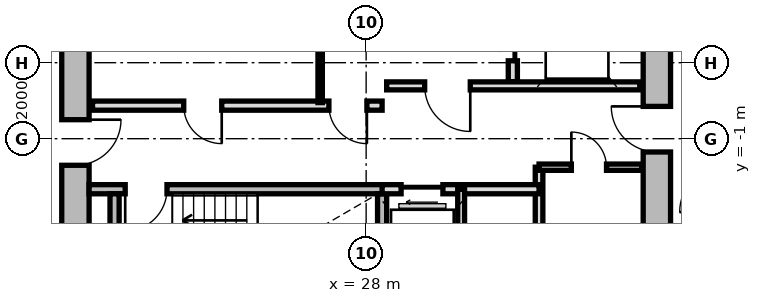
"""IFC4 building model, lengths in metres.
Left out: names, types, materials, properties, quantities, classifications, styles, units other than length and angle.
Written with IfcOpenShell. Run it as: python <this file> out.ifc"""

import sys

from ifc_helpers import new_model, si_unit, direction, frame, frame_2d, origin, place, context, subcontext, project, spatial, rectangle, extrude, source, transform, mapped, element, fill, save


model = new_model("IFC4")
c1 = context("Model", 3, precision=1e-05, world=origin(), true_north=direction((0.0, 1.0)))
c2 = subcontext(c1, "Body", "Model", "MODEL_VIEW")
j1 = project(units=[si_unit("LENGTHUNIT", "METRE"), si_unit("PLANEANGLEUNIT", "RADIAN")], contexts=[c1])
p1 = place(None, origin())
s1 = spatial("IfcSite", under=j1, at=p1, CompositionType="ELEMENT")
p2 = place(p1, origin())
s2 = spatial("IfcBuilding", under=s1, at=p2, CompositionType="ELEMENT")
p3 = place(p2, frame((0.0, 0.0, 99.3)))
s3 = spatial("IfcBuildingStorey", under=s2, at=p3, CompositionType="ELEMENT", Elevation=99.3)
m1 = source(origin(), c2, "Body", "SweptSolid", [
    extrude(rectangle(XDim=11.0, YDim=0.72, at=frame_2d((5.5, 0.0))), origin(), (0.0, 0.0, 1.0), 2.79),
])
p4 = place(p3, frame((20.35, -5.5, 0.0), z_axis=(0.0, 0.0, 1.0), x_axis=(0.0, 1.0, 0.0)))
e1 = element("IfcWall", 1, at=p4, inside=s3, PredefinedType="SHEAR", context=c2, shape_type="MappedRepresentation", body=[
    mapped(m1, transform((0.0, 0.0, 0.0), x_axis=(1.0, 0.0, 0.0), y_axis=(0.0, 1.0, 0.0), z_axis=(0.0, 0.0, 1.0), scale=1.0)),
])
p5 = place(p4, frame((3.8, 0.0, 0.0)))
e2 = element("IfcOpeningElement", 2, at=p5, cuts=e1, PredefinedType="OPENING", context=c2, shape_type="SweptSolid", body=[
    extrude(rectangle(XDim=1.2, YDim=2.15, at=frame_2d((0.6, 1.075))), frame((0.0, 0.37, 0.0), z_axis=(0.0, -1.0, 0.0), x_axis=(1.0, 0.0, 0.0)), (0.0, 0.0, 1.0), 0.74),
])
p6 = place(p3, frame((35.65, 5.5, 0.0), z_axis=(0.0, 0.0, 1.0), x_axis=(0.0, -1.0, 0.0)))
e3 = element("IfcWall", 3, at=p6, inside=s3, PredefinedType="SHEAR", context=c2, shape_type="MappedRepresentation", body=[
    mapped(m1, transform((0.0, 0.0, 0.0), x_axis=(1.0, 0.0, 0.0), y_axis=(0.0, 1.0, 0.0), z_axis=(0.0, 0.0, 1.0), scale=1.0)),
])
p7 = place(p6, frame((5.65, 0.0, 0.0)))
e4 = element("IfcOpeningElement", 4, at=p7, cuts=e3, PredefinedType="OPENING", context=c2, shape_type="SweptSolid", body=[
    extrude(rectangle(XDim=1.2, YDim=2.15, at=frame_2d((0.6, 1.075))), frame((0.0, 0.37, 0.0), z_axis=(0.0, -1.0, 0.0), x_axis=(1.0, 0.0, 0.0)), (0.0, 0.0, 1.0), 0.74),
])
m2 = source(origin(), c2, "Body", "SweptSolid", [
    extrude(rectangle(XDim=7.83, YDim=0.24, at=frame_2d((3.915, 0.0))), origin(), (0.0, 0.0, 1.0), 2.79),
])
p8 = place(p3, frame((20.71, -2.33, 0.0), z_axis=(0.0, 0.0, 1.0), x_axis=(1.0, 0.0, 0.0)))
e5 = element("IfcWall", 5, at=p8, inside=s3, PredefinedType="PARTITIONING", context=c2, shape_type="MappedRepresentation", body=[
    mapped(m2, transform((0.0, 0.0, 0.0), x_axis=(1.0, 0.0, 0.0), y_axis=(0.0, 1.0, 0.0), z_axis=(0.0, 0.0, 1.0), scale=1.0)),
])
p9 = place(p8, frame((0.95, 0.0, 0.0)))
e6 = element("IfcOpeningElement", 6, at=p9, cuts=e5, PredefinedType="OPENING", context=c2, shape_type="SweptSolid", body=[
    extrude(rectangle(XDim=1.1, YDim=2.15, at=frame_2d((0.55, 1.075))), frame((0.0, 0.13, 0.0), z_axis=(0.0, -1.0, 0.0), x_axis=(1.0, 0.0, 0.0)), (0.0, 0.0, 1.0), 0.26),
])
m3 = source(origin(), c2, "Body", "SweptSolid", [
    extrude(rectangle(XDim=3.14, YDim=0.24, at=frame_2d((1.57, 0.0))), origin(), (0.0, 0.0, 1.0), 2.79),
])
for number, where, z_axis, x_axis in (
    (7, (21.38, -5.59, 0.0), (0.0, 0.0, 1.0), (0.0, 1.0, 0.0)),
    (8, (28.42, -5.59, 0.0), (0.0, 0.0, 1.0), (0.0, 1.0, 0.0)),
):
    element("IfcWall", number, at=place(p3, frame(where, z_axis=z_axis, x_axis=x_axis)), inside=s3, PredefinedType="PARTITIONING", context=c2, shape_type="MappedRepresentation", body=[
        mapped(m3, transform((0.0, 0.0, 0.0), x_axis=(1.0, 0.0, 0.0), y_axis=(0.0, 1.0, 0.0), z_axis=(0.0, 0.0, 1.0), scale=1.0)),
    ])
m4 = source(origin(), c2, "Body", "SweptSolid", [
    extrude(rectangle(XDim=5.0, YDim=0.24, at=frame_2d((2.5, 0.0))), origin(), (0.0, 0.0, 1.0), 2.775),
])
p10 = place(p3, frame((31.86, 0.5, 0.0), z_axis=(0.0, 0.0, 1.0), x_axis=(0.0, 1.0, 0.0)))
e9 = element("IfcWall", 9, at=p10, inside=s3, PredefinedType="PARTITIONING", context=c2, shape_type="MappedRepresentation", body=[
    mapped(m4, transform((0.0, 0.0, 0.0), x_axis=(1.0, 0.0, 0.0), y_axis=(0.0, 1.0, 0.0), z_axis=(0.0, 0.0, 1.0), scale=1.0)),
])
p11 = place(p10, frame((3.05, 0.0, 0.0)))
e10 = element("IfcOpeningElement", 10, at=p11, cuts=e9, PredefinedType="OPENING", context=c2, shape_type="SweptSolid", body=[
    extrude(rectangle(XDim=1.3, YDim=2.2, at=frame_2d((0.65, 1.1))), frame((0.0, 0.13, 0.0), z_axis=(0.0, -1.0, 0.0), x_axis=(1.0, 0.0, 0.0)), (0.0, 0.0, 1.0), 0.26),
])
p12 = place(p10, frame((0.55, 0.0, 0.0)))
e11 = element("IfcOpeningElement", 11, at=p12, cuts=e9, PredefinedType="OPENING", context=c2, shape_type="SweptSolid", body=[
    extrude(rectangle(XDim=1.3, YDim=2.2, at=frame_2d((0.65, 1.1))), frame((0.0, 0.13, 0.0), z_axis=(0.0, -1.0, 0.0), x_axis=(1.0, 0.0, 0.0)), (0.0, 0.0, 1.0), 0.26),
])
m5 = source(origin(), c2, "Body", "SweptSolid", [
    extrude(rectangle(XDim=6.66, YDim=0.21, at=frame_2d((3.33, 0.0))), origin(), (0.0, 0.0, 1.0), 2.775),
])
p13 = place(p3, frame((28.54, 0.39, 0.0), z_axis=(0.0, 0.0, 1.0), x_axis=(1.0, 0.0, 0.0)))
e12 = element("IfcWall", 12, at=p13, inside=s3, PredefinedType="PARTITIONING", context=c2, shape_type="MappedRepresentation", body=[
    mapped(m5, transform((0.0, 0.0, 0.0), x_axis=(1.0, 0.0, 0.0), y_axis=(0.0, 1.0, 0.0), z_axis=(0.0, 0.0, 1.0), scale=1.0)),
])
p14 = place(p13, frame((1.0, 0.0, 0.0)))
e13 = element("IfcOpeningElement", 13, at=p14, cuts=e12, PredefinedType="OPENING", context=c2, shape_type="SweptSolid", body=[
    extrude(rectangle(XDim=1.2, YDim=2.15, at=frame_2d((0.6, 1.075))), frame((0.0, 0.115, 0.0), z_axis=(0.0, -1.0, 0.0), x_axis=(1.0, 0.0, 0.0)), (0.0, 0.0, 1.0), 0.23),
])
m6 = source(origin(), c2, "Body", "SweptSolid", [
    extrude(rectangle(XDim=7.62, YDim=0.24, at=frame_2d((3.81, 0.0))), origin(), (0.0, 0.0, 1.0), 2.775),
])
p15 = place(p3, frame((20.8, -0.13, 0.0), z_axis=(0.0, 0.0, 1.0), x_axis=(1.0, 0.0, 0.0)))
e14 = element("IfcWall", 14, at=p15, inside=s3, PredefinedType="PARTITIONING", context=c2, shape_type="MappedRepresentation", body=[
    mapped(m6, transform((0.0, 0.0, 0.0), x_axis=(1.0, 0.0, 0.0), y_axis=(0.0, 1.0, 0.0), z_axis=(0.0, 0.0, 1.0), scale=1.0)),
])
p16 = place(p15, frame((6.22, 0.0, 0.0)))
e15 = element("IfcOpeningElement", 15, at=p16, cuts=e14, PredefinedType="OPENING", context=c2, shape_type="SweptSolid", body=[
    extrude(rectangle(XDim=1.0, YDim=2.1, at=frame_2d((0.5, 1.05))), frame((0.0, 0.13, 0.0), z_axis=(0.0, -1.0, 0.0), x_axis=(1.0, 0.0, 0.0)), (0.0, 0.0, 1.0), 0.26),
])
p17 = place(p15, frame((2.4, 0.0, 0.0)))
e16 = element("IfcOpeningElement", 16, at=p17, cuts=e14, PredefinedType="OPENING", context=c2, shape_type="SweptSolid", body=[
    extrude(rectangle(XDim=1.0, YDim=2.1, at=frame_2d((0.5, 1.05))), frame((0.0, 0.13, 0.0), z_axis=(0.0, -1.0, 0.0), x_axis=(1.0, 0.0, 0.0)), (0.0, 0.0, 1.0), 0.26),
])
m7 = source(origin(), c2, "Body", "SweptSolid", [
    extrude(rectangle(XDim=2.33, YDim=0.115, at=frame_2d((1.165, 0.0))), origin(), (0.0, 0.0, 1.0), 2.775),
])
p18 = place(p3, frame((26.79, -0.05, 0.0), z_axis=(0.0, 0.0, 1.0), x_axis=(0.0, 1.0, 0.0)))
e17 = element("IfcWall", 17, at=p18, inside=s3, PredefinedType="PARTITIONING", context=c2, shape_type="MappedRepresentation", body=[
    mapped(m7, transform((0.0, 0.0, 0.0), x_axis=(1.0, 0.0, 0.0), y_axis=(0.0, 1.0, 0.0), z_axis=(0.0, 0.0, 1.0), scale=1.0)),
])
m8 = source(origin(), c2, "Body", "SweptSolid", [
    extrude(rectangle(XDim=3.8, YDim=0.2, at=frame_2d((1.9, 0.0))), origin(), (0.0, 0.0, 1.0), 2.775),
])
p19 = place(p3, frame((32.55, -5.55, 0.0), z_axis=(0.0, 0.0, 1.0), x_axis=(0.0, 1.0, 0.0)))
e18 = element("IfcWall", 18, at=p19, inside=s3, PredefinedType="PARTITIONING", context=c2, shape_type="MappedRepresentation", body=[
    mapped(m8, transform((0.0, 0.0, 0.0), x_axis=(1.0, 0.0, 0.0), y_axis=(0.0, 1.0, 0.0), z_axis=(0.0, 0.0, 1.0), scale=1.0)),
])
m9 = source(origin(), c2, "Body", "SweptSolid", [
    extrude(rectangle(XDim=4.13, YDim=0.24, at=frame_2d((2.065, 0.0))), origin(), (0.0, 0.0, 1.0), 2.775),
])
p20 = place(p3, frame((28.42, -2.33, 0.0), z_axis=(0.0, 0.0, 1.0), x_axis=(1.0, 0.0, 0.0)))
e19 = element("IfcWall", 19, at=p20, inside=s3, PredefinedType="PARTITIONING", context=c2, shape_type="MappedRepresentation", body=[
    mapped(m9, transform((0.0, 0.0, 0.0), x_axis=(1.0, 0.0, 0.0), y_axis=(0.0, 1.0, 0.0), z_axis=(0.0, 0.0, 1.0), scale=1.0)),
])
p21 = place(p20, frame((0.5, 0.0, 0.0)))
e20 = element("IfcOpeningElement", 20, at=p21, cuts=e19, PredefinedType="OPENING", context=c2, shape_type="SweptSolid", body=[
    extrude(rectangle(XDim=1.1, YDim=2.2, at=frame_2d((0.55, 1.1))), frame((0.0, 0.13, 0.0), z_axis=(0.0, -1.0, 0.0), x_axis=(1.0, 0.0, 0.0)), (0.0, 0.0, 1.0), 0.26),
])
m10 = source(origin(), c2, "Body", "SweptSolid", [
    extrude(rectangle(XDim=3.22, YDim=0.18, at=frame_2d((1.61, 0.0))), origin(), (0.0, 0.0, 1.0), 2.775),
])
p22 = place(p3, frame((30.5, -5.55, 0.0), z_axis=(0.0, 0.0, 1.0), x_axis=(0.0, 1.0, 0.0)))
e21 = element("IfcWall", 21, at=p22, inside=s3, PredefinedType="PARTITIONING", context=c2, shape_type="MappedRepresentation", body=[
    mapped(m10, transform((0.0, 0.0, 0.0), x_axis=(1.0, 0.0, 0.0), y_axis=(0.0, 1.0, 0.0), z_axis=(0.0, 0.0, 1.0), scale=1.0)),
])
m11 = source(origin(), c2, "Body", "SweptSolid", [
    extrude(rectangle(XDim=2.7, YDim=0.165, at=frame_2d((1.35, 0.0))), origin(), (0.0, 0.0, 1.0), 2.775),
])
p23 = place(p3, frame((32.55, -1.75, 0.0), z_axis=(0.0, 0.0, 1.0), x_axis=(1.0, 0.0, 0.0)))
e22 = element("IfcWall", 22, at=p23, inside=s3, PredefinedType="PARTITIONING", context=c2, shape_type="MappedRepresentation", body=[
    mapped(m11, transform((0.0, 0.0, 0.0), x_axis=(1.0, 0.0, 0.0), y_axis=(0.0, 1.0, 0.0), z_axis=(0.0, 0.0, 1.0), scale=1.0)),
])
p24 = place(p23, frame((0.85, 0.0, 0.0)))
e23 = element("IfcOpeningElement", 23, at=p24, cuts=e22, PredefinedType="OPENING", context=c2, shape_type="SweptSolid", body=[
    extrude(rectangle(XDim=0.925, YDim=2.1, at=frame_2d((0.462, 1.05))), frame((0.0, 0.093, 0.0), z_axis=(0.0, -1.0, 0.0), x_axis=(1.0, 0.0, 0.0)), (0.0, 0.0, 1.0), 0.185),
])
m12 = source(origin(), c2, "Body", "SweptSolid", [
    extrude(rectangle(XDim=1.1, YDim=2.15, at=frame_2d((0.55, 1.075))), frame((0.0, 0.025, 0.0), z_axis=(0.0, -1.0, 0.0), x_axis=(1.0, 0.0, 0.0)), (0.0, 0.0, 1.0), 0.05),
])
p25 = place(p9, frame((1.1, 0.0, 0.0), z_axis=(0.0, 0.0, 1.0), x_axis=(-1.0, 0.0, 0.0)))
e24 = element("IfcDoor", 24, at=p25, inside=s3, OperationType="SINGLE_SWING_RIGHT", PredefinedType="DOOR", context=c2, shape_type="MappedRepresentation", body=[
    mapped(m12, transform((0.0, 0.0, 0.0), x_axis=(1.0, 0.0, 0.0), y_axis=(0.0, 1.0, 0.0), z_axis=(0.0, 0.0, 1.0), scale=1.0)),
])
fill(e6, e24)
m13 = source(origin(), c2, "Body", "SweptSolid", [
    extrude(rectangle(XDim=1.3, YDim=2.2, at=frame_2d((0.65, 1.1))), frame((0.0, 0.025, 0.0), z_axis=(0.0, -1.0, 0.0), x_axis=(1.0, 0.0, 0.0)), (0.0, 0.0, 1.0), 0.05),
])
p26 = place(p12, origin())
e25 = element("IfcDoor", 25, at=p26, inside=s3, OperationType="SLIDING_TO_RIGHT", PredefinedType="DOOR", context=c2, shape_type="MappedRepresentation", body=[
    mapped(m13, transform((0.0, 0.0, 0.0), x_axis=(1.0, 0.0, 0.0), y_axis=(0.0, 1.0, 0.0), z_axis=(0.0, 0.0, 1.0), scale=1.0)),
])
fill(e11, e25)
m14 = source(origin(), c2, "Body", "SweptSolid", [
    extrude(rectangle(XDim=1.2, YDim=2.15, at=frame_2d((0.6, 1.075))), frame((0.0, 0.025, 0.0), z_axis=(0.0, -1.0, 0.0), x_axis=(1.0, 0.0, 0.0)), (0.0, 0.0, 1.0), 0.05),
])
p27 = place(p14, frame((1.2, 0.0, 0.0), z_axis=(0.0, 0.0, 1.0), x_axis=(-1.0, 0.0, 0.0)))
e26 = element("IfcDoor", 26, at=p27, inside=s3, OperationType="SINGLE_SWING_LEFT", PredefinedType="DOOR", context=c2, shape_type="MappedRepresentation", body=[
    mapped(m14, transform((0.0, 0.0, 0.0), x_axis=(1.0, 0.0, 0.0), y_axis=(0.0, 1.0, 0.0), z_axis=(0.0, 0.0, 1.0), scale=1.0)),
])
fill(e13, e26)
p28 = place(p5, frame((1.2, 0.0, 0.0), z_axis=(0.0, 0.0, 1.0), x_axis=(-1.0, 0.0, 0.0)))
e27 = element("IfcDoor", 27, at=p28, inside=s3, OperationType="SINGLE_SWING_LEFT", PredefinedType="DOOR", context=c2, shape_type="MappedRepresentation", body=[
    mapped(m14, transform((0.0, 0.0, 0.0), x_axis=(1.0, 0.0, 0.0), y_axis=(0.0, 1.0, 0.0), z_axis=(0.0, 0.0, 1.0), scale=1.0)),
])
fill(e2, e27)
p29 = place(p7, frame((1.2, 0.0, 0.0), z_axis=(0.0, 0.0, 1.0), x_axis=(-1.0, 0.0, 0.0)))
e28 = element("IfcDoor", 28, at=p29, inside=s3, OperationType="SINGLE_SWING_RIGHT", PredefinedType="DOOR", context=c2, shape_type="MappedRepresentation", body=[
    mapped(m14, transform((0.0, 0.0, 0.0), x_axis=(1.0, 0.0, 0.0), y_axis=(0.0, 1.0, 0.0), z_axis=(0.0, 0.0, 1.0), scale=1.0)),
])
fill(e4, e28)
m15 = source(origin(), c2, "Body", "SweptSolid", [
    extrude(rectangle(XDim=1.0, YDim=2.1, at=frame_2d((0.5, 1.05))), frame((0.0, 0.025, 0.0), z_axis=(0.0, -1.0, 0.0), x_axis=(1.0, 0.0, 0.0)), (0.0, 0.0, 1.0), 0.05),
])
p30 = place(p16, frame((1.0, 0.0, 0.0), z_axis=(0.0, 0.0, 1.0), x_axis=(-1.0, 0.0, 0.0)))
e29 = element("IfcDoor", 29, at=p30, inside=s3, OperationType="SINGLE_SWING_LEFT", PredefinedType="DOOR", context=c2, shape_type="MappedRepresentation", body=[
    mapped(m15, transform((0.0, 0.0, 0.0), x_axis=(1.0, 0.0, 0.0), y_axis=(0.0, 1.0, 0.0), z_axis=(0.0, 0.0, 1.0), scale=1.0)),
])
fill(e15, e29)
p31 = place(p17, frame((1.0, 0.0, 0.0), z_axis=(0.0, 0.0, 1.0), x_axis=(-1.0, 0.0, 0.0)))
e30 = element("IfcDoor", 30, at=p31, inside=s3, OperationType="SINGLE_SWING_LEFT", PredefinedType="DOOR", context=c2, shape_type="MappedRepresentation", body=[
    mapped(m15, transform((0.0, 0.0, 0.0), x_axis=(1.0, 0.0, 0.0), y_axis=(0.0, 1.0, 0.0), z_axis=(0.0, 0.0, 1.0), scale=1.0)),
])
fill(e16, e30)
m16 = source(origin(), c2, "Body", "SweptSolid", [
    extrude(rectangle(XDim=1.1, YDim=2.2, at=frame_2d((0.55, 1.1))), frame((0.0, 0.025, 0.0), z_axis=(0.0, -1.0, 0.0), x_axis=(1.0, 0.0, 0.0)), (0.0, 0.0, 1.0), 0.05),
])
p32 = place(p21, frame((1.1, 0.0, 0.0), z_axis=(0.0, 0.0, 1.0), x_axis=(-1.0, 0.0, 0.0)))
e31 = element("IfcDoor", 31, at=p32, inside=s3, OperationType="SLIDING_TO_LEFT", PredefinedType="DOOR", context=c2, shape_type="MappedRepresentation", body=[
    mapped(m16, transform((0.0, 0.0, 0.0), x_axis=(1.0, 0.0, 0.0), y_axis=(0.0, 1.0, 0.0), z_axis=(0.0, 0.0, 1.0), scale=1.0)),
])
fill(e20, e31)
m17 = source(origin(), c2, "Body", "SweptSolid", [
    extrude(rectangle(XDim=0.925, YDim=2.1, at=frame_2d((0.462, 1.05))), frame((0.0, 0.025, 0.0), z_axis=(0.0, -1.0, 0.0), x_axis=(1.0, 0.0, 0.0)), (0.0, 0.0, 1.0), 0.05),
])
p33 = place(p24, origin())
e32 = element("IfcDoor", 32, at=p33, inside=s3, OperationType="SINGLE_SWING_LEFT", PredefinedType="DOOR", context=c2, shape_type="MappedRepresentation", body=[
    mapped(m17, transform((0.0, 0.0, 0.0), x_axis=(1.0, 0.0, 0.0), y_axis=(0.0, 1.0, 0.0), z_axis=(0.0, 0.0, 1.0), scale=1.0)),
])
fill(e23, e32)
save(model, sys.argv[1])
